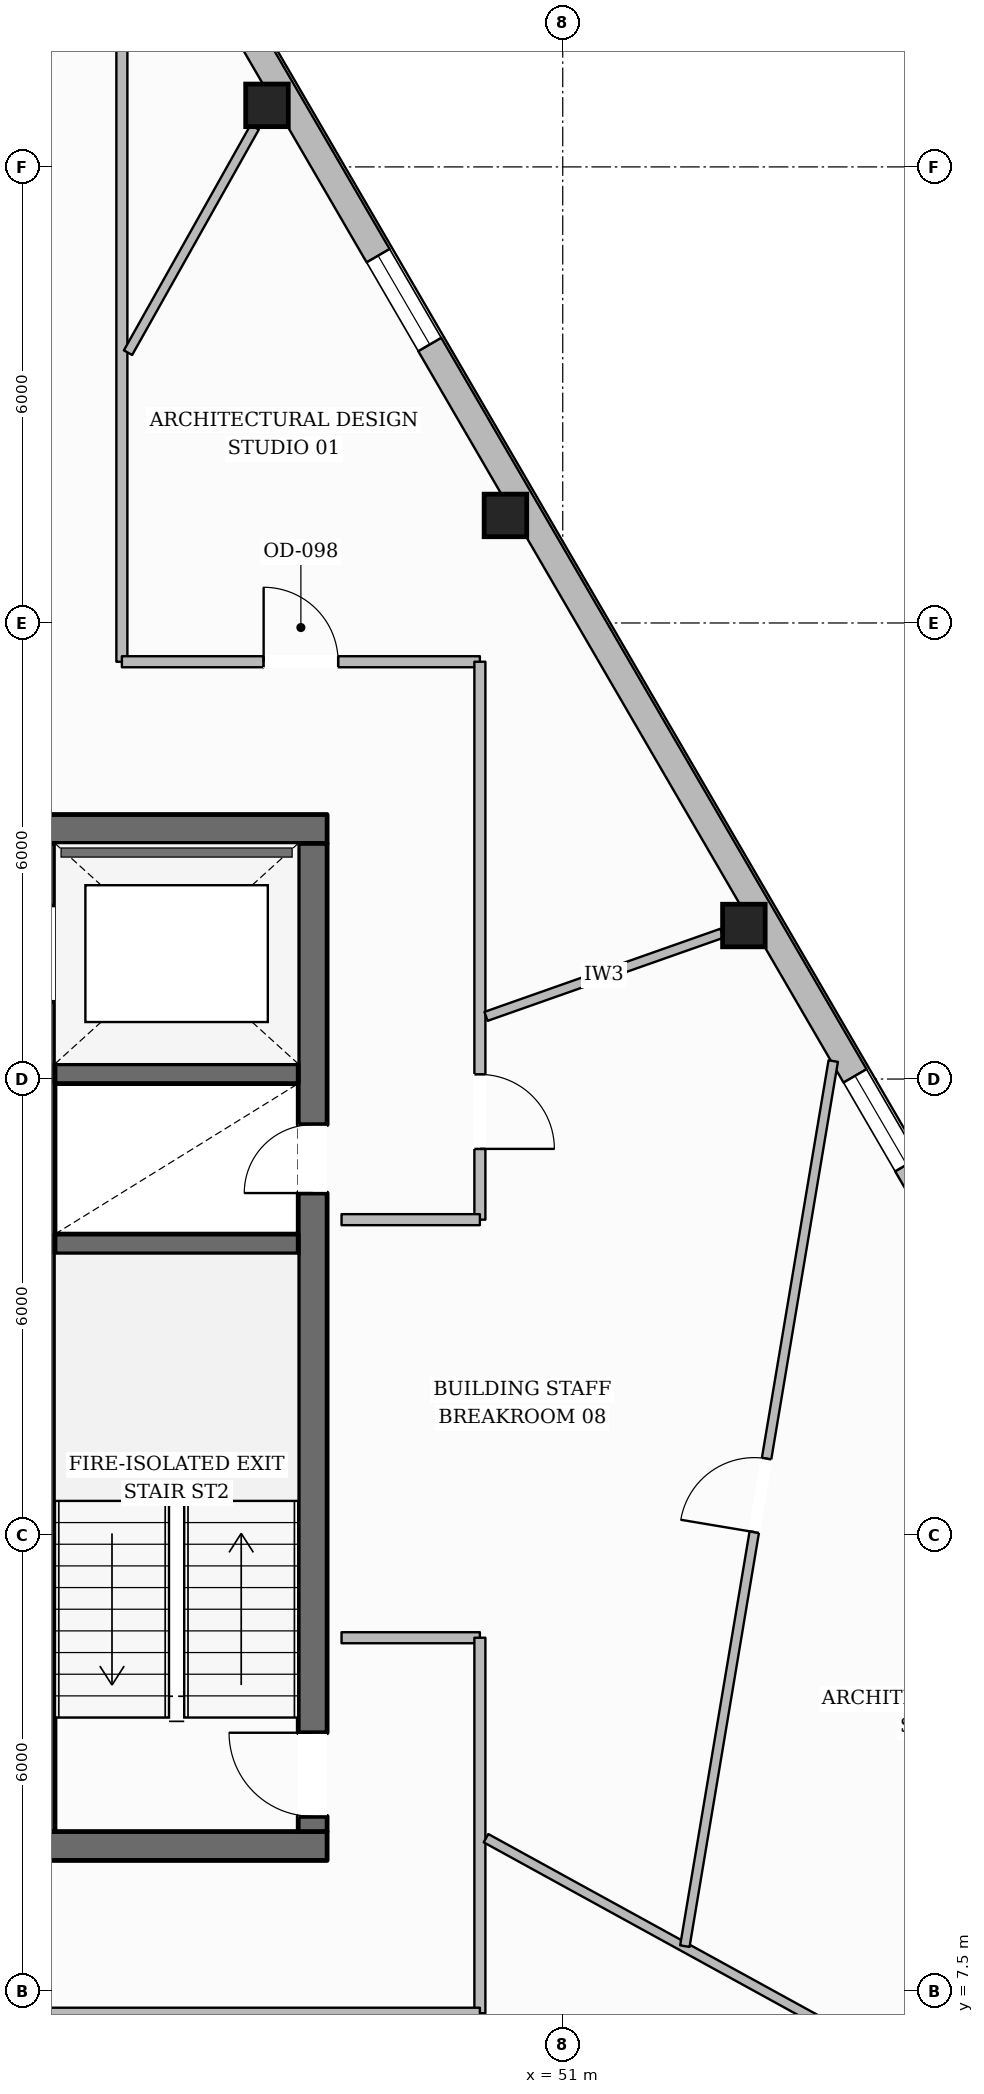
"""IFC4 building model, lengths in metres.
Left out: names, types, materials, properties, quantities, classifications, styles, units other than length and angle.
Written with IfcOpenShell. Run it as: python <this file> out.ifc"""

import sys

from ifc_helpers import new_model, si_unit, direction, frame, frame_2d, origin, origin_2d, place, context, subcontext, project, spatial, rectangle, hollow_rectangle, extrude, element, fill, save


model = new_model("IFC4")
c1 = context("Model", 3, precision=1e-05, world=origin(), true_north=direction((0.0, 1.0)))
c2 = subcontext(c1, "Body", "Model", "MODEL_VIEW")
j1 = project(units=[si_unit("LENGTHUNIT", "METRE"), si_unit("PLANEANGLEUNIT", "RADIAN")], contexts=[c1])
p1 = place(None, origin())
s1 = spatial("IfcSite", under=j1, at=p1, CompositionType="ELEMENT")
p2 = place(p1, origin())
s2 = spatial("IfcBuilding", under=s1, at=p2, CompositionType="ELEMENT")
p3 = place(p2, frame((0.0, 0.0, 281.85)))
s3 = spatial("IfcBuildingStorey", under=s2, at=p3, CompositionType="ELEMENT", Elevation=281.85)
p4 = place(p3, frame((28.1, 9.41, 0.0), z_axis=(0.0, 0.0, 1.0), x_axis=(1.0, 0.0, 0.0)))
e1 = element("IfcWall", 1, at=p4, inside=s3, PredefinedType="SOLIDWALL", context=c2, shape_type="SweptSolid", body=[
    extrude(rectangle(XDim=19.8, YDim=0.38, at=frame_2d((9.9, 0.0))), origin(), (0.0, 0.0, 1.0), 3.61),
])
p5 = place(p4, frame((10.4, 0.0, 0.0)))
e2 = element("IfcOpeningElement", 2, at=p5, cuts=e1, PredefinedType="OPENING", context=c2, shape_type="SweptSolid", body=[
    extrude(rectangle(XDim=1.4, YDim=2.2, at=frame_2d((0.7, 1.1))), frame((0.0, 0.2, 0.0), z_axis=(0.0, -1.0, 0.0), x_axis=(1.0, 0.0, 0.0)), (0.0, 0.0, 1.0), 0.4),
])
p6 = place(p3, frame((28.1, 22.79, 0.0), z_axis=(0.0, 0.0, 1.0), x_axis=(1.0, 0.0, 0.0)))
e3 = element("IfcWall", 3, at=p6, inside=s3, PredefinedType="SOLIDWALL", context=c2, shape_type="SweptSolid", body=[
    extrude(rectangle(XDim=19.8, YDim=0.38, at=frame_2d((9.9, 0.0))), origin(), (0.0, 0.0, 1.0), 3.61),
])
p7 = place(p6, frame((6.175, 0.0, 0.0)))
e4 = element("IfcOpeningElement", 4, at=p7, cuts=e3, PredefinedType="OPENING", context=c2, shape_type="SweptSolid", body=[
    extrude(rectangle(XDim=1.05, YDim=2.15, at=frame_2d((0.525, 1.075))), frame((0.0, 0.2, 0.0), z_axis=(0.0, -1.0, 0.0), x_axis=(1.0, 0.0, 0.0)), (0.0, 0.0, 1.0), 0.4),
])
p8 = place(p6, frame((12.575, 0.0, 0.0)))
e5 = element("IfcOpeningElement", 5, at=p8, cuts=e3, PredefinedType="OPENING", context=c2, shape_type="SweptSolid", body=[
    extrude(rectangle(XDim=1.05, YDim=2.15, at=frame_2d((0.525, 1.075))), frame((0.0, 0.2, 0.0), z_axis=(0.0, -1.0, 0.0), x_axis=(1.0, 0.0, 0.0)), (0.0, 0.0, 1.0), 0.4),
])
p9 = place(p3, frame((47.71, 9.6, 0.0), z_axis=(0.0, 0.0, 1.0), x_axis=(0.0, 1.0, 0.0)))
e6 = element("IfcWall", 6, at=p9, inside=s3, PredefinedType="SOLIDWALL", context=c2, shape_type="SweptSolid", body=[
    extrude(rectangle(XDim=13.0, YDim=0.38, at=frame_2d((6.5, 0.0))), origin(), (0.0, 0.0, 1.0), 3.61),
])
p10 = place(p9, frame((0.2, 0.0, 0.0)))
e7 = element("IfcOpeningElement", 7, at=p10, cuts=e6, PredefinedType="OPENING", context=c2, shape_type="SweptSolid", body=[
    extrude(rectangle(XDim=1.1, YDim=2.15, at=frame_2d((0.55, 1.075))), frame((0.0, 0.2, 0.0), z_axis=(0.0, -1.0, 0.0), x_axis=(1.0, 0.0, 0.0)), (0.0, 0.0, 1.0), 0.4),
])
p11 = place(p9, frame((8.4, 0.0, 0.0)))
e8 = element("IfcOpeningElement", 8, at=p11, cuts=e6, PredefinedType="OPENING", context=c2, shape_type="SweptSolid", body=[
    extrude(rectangle(XDim=0.9, YDim=2.1, at=frame_2d((0.45, 1.05))), frame((0.0, 0.2, 0.0), z_axis=(0.0, -1.0, 0.0), x_axis=(1.0, 0.0, 0.0)), (0.0, 0.0, 1.0), 0.4),
])
p12 = place(p3, frame((44.19, 9.6, 0.0), z_axis=(0.0, 0.0, 1.0), x_axis=(0.0, 1.0, 0.0)))
e9 = element("IfcWall", 9, at=p12, inside=s3, PredefinedType="SHEAR", context=c2, shape_type="SweptSolid", body=[
    extrude(rectangle(XDim=13.0, YDim=0.26, at=frame_2d((6.5, 0.0))), origin(), (0.0, 0.0, 1.0), 3.61),
])
p13 = place(p12, frame((10.925, 0.0, 0.0)))
e10 = element("IfcOpeningElement", 10, at=p13, cuts=e9, PredefinedType="OPENING", context=c2, shape_type="SweptSolid", body=[
    extrude(rectangle(XDim=1.25, YDim=2.25, at=frame_2d((0.625, 1.125))), frame((0.0, 0.14, 0.0), z_axis=(0.0, -1.0, 0.0), x_axis=(1.0, 0.0, 0.0)), (0.0, 0.0, 1.0), 0.28),
])
for number, where, z_axis, x_axis in (
    (11, (44.32, 17.33, 0.0), (0.0, 0.0, 1.0), (1.0, 0.0, 0.0)),
    (12, (44.32, 19.57, 0.0), (0.0, 0.0, 1.0), (1.0, 0.0, 0.0)),
):
    element("IfcWall", number, at=place(p3, frame(where, z_axis=z_axis, x_axis=x_axis)), inside=s3, PredefinedType="SHEAR", context=c2, shape_type="SweptSolid", body=[
        extrude(rectangle(XDim=3.2, YDim=0.26, at=frame_2d((1.6, 0.0))), origin(), (0.0, 0.0, 1.0), 3.61),
    ])
for number, where, z_axis, x_axis in (
    (13, (53.383, 21.52, 0.0), (0.0, 0.0, 1.0), (1.0, 0.0, 0.0)),
    (14, (50.246, 26.915, 0.0), (0.0, 0.0, 1.0), (1.0, 0.0, 0.0)),
    (15, (47.109, 32.31, 0.0), (0.0, 0.0, 1.0), (1.0, 0.0, 0.0)),
):
    element("IfcColumn", number, at=place(p3, frame(where, z_axis=z_axis, x_axis=x_axis)), inside=s3, PredefinedType="COLUMN", context=c2, shape_type="SweptSolid", body=[
        extrude(hollow_rectangle(XDim=0.56, YDim=0.56, WallThickness=0.025, at=origin_2d()), origin(), (0.0, 0.0, 1.0), 3.61),
    ])
p14 = place(p3, frame((40.827, 43.65, 0.0), z_axis=(0.0, 0.0, 1.0), x_axis=(0.502670175865, -0.864478278672, 0.0)))
e16 = element("IfcWall", 16, at=p14, inside=s3, PredefinedType="STANDARD", context=c2, shape_type="SweptSolid", body=[
    extrude(rectangle(XDim=38.406, YDim=0.35, at=frame_2d((19.203, 0.0))), origin(), (0.0, 0.0, 1.0), 3.196),
])
p15 = place(p14, frame((34.128, 0.0, 0.65)))
e17 = element("IfcOpeningElement", 17, at=p15, cuts=e16, PredefinedType="OPENING", context=c2, shape_type="SweptSolid", body=[
    extrude(rectangle(XDim=1.35, YDim=1.75, at=frame_2d((0.675, 0.875))), frame((0.0, 0.185, 0.0), z_axis=(0.0, -1.0, 0.0), x_axis=(1.0, 0.0, 0.0)), (0.0, 0.0, 1.0), 0.37),
])
p16 = place(p14, frame((27.888, 0.0, 0.65)))
e18 = element("IfcOpeningElement", 18, at=p16, cuts=e16, PredefinedType="OPENING", context=c2, shape_type="SweptSolid", body=[
    extrude(rectangle(XDim=1.35, YDim=1.75, at=frame_2d((0.675, 0.875))), frame((0.0, 0.185, 0.0), z_axis=(0.0, -1.0, 0.0), x_axis=(1.0, 0.0, 0.0)), (0.0, 0.0, 1.0), 0.37),
])
p17 = place(p14, frame((15.406, 0.0, 0.65)))
e19 = element("IfcOpeningElement", 19, at=p17, cuts=e16, PredefinedType="OPENING", context=c2, shape_type="SweptSolid", body=[
    extrude(rectangle(XDim=1.35, YDim=1.75, at=frame_2d((0.675, 0.875))), frame((0.0, 0.185, 0.0), z_axis=(0.0, -1.0, 0.0), x_axis=(1.0, 0.0, 0.0)), (0.0, 0.0, 1.0), 0.37),
])
p18 = place(p14, frame((9.165, 0.0, 0.65)))
e20 = element("IfcOpeningElement", 20, at=p18, cuts=e16, PredefinedType="OPENING", context=c2, shape_type="SweptSolid", body=[
    extrude(rectangle(XDim=1.35, YDim=1.75, at=frame_2d((0.675, 0.875))), frame((0.0, 0.185, 0.0), z_axis=(0.0, -1.0, 0.0), x_axis=(1.0, 0.0, 0.0)), (0.0, 0.0, 1.0), 0.37),
])
p19 = place(p14, frame((2.924, 0.0, 0.65)))
e21 = element("IfcOpeningElement", 21, at=p19, cuts=e16, PredefinedType="OPENING", context=c2, shape_type="SweptSolid", body=[
    extrude(rectangle(XDim=1.35, YDim=1.75, at=frame_2d((0.675, 0.875))), frame((0.0, 0.185, 0.0), z_axis=(0.0, -1.0, 0.0), x_axis=(1.0, 0.0, 0.0)), (0.0, 0.0, 1.0), 0.37),
])
p20 = place(p3, frame((45.2, 33.482, 0.0), z_axis=(0.0, 0.0, 1.0), x_axis=(0.0, -1.0, 0.0)))
e22 = element("IfcWall", 22, at=p20, inside=s3, PredefinedType="PARTITIONING", context=c2, shape_type="SweptSolid", body=[
    extrude(rectangle(XDim=8.492, YDim=0.145, at=frame_2d((4.246, 0.0))), origin(), (0.0, 0.0, 1.0), 3.61),
])
p21 = place(p3, frame((45.2, 24.99, 0.0), z_axis=(0.0, 0.0, 1.0), x_axis=(1.0, 0.0, 0.0)))
e23 = element("IfcWall", 23, at=p21, inside=s3, PredefinedType="PARTITIONING", context=c2, shape_type="SweptSolid", body=[
    extrude(rectangle(XDim=4.71, YDim=0.145, at=frame_2d((2.355, 0.0))), origin(), (0.0, 0.0, 1.0), 3.61),
])
p22 = place(p21, frame((1.865, 0.0, 0.0)))
e24 = element("IfcOpeningElement", 24, at=p22, cuts=e23, PredefinedType="OPENING", context=c2, shape_type="SweptSolid", body=[
    extrude(rectangle(XDim=0.98, YDim=2.15, at=frame_2d((0.49, 1.075))), frame((0.0, 0.083, 0.0), z_axis=(0.0, -1.0, 0.0), x_axis=(1.0, 0.0, 0.0)), (0.0, 0.0, 1.0), 0.165),
])
p23 = place(p3, frame((49.91, 24.99, 0.0), z_axis=(0.0, 0.0, 1.0), x_axis=(0.0, -1.0, 0.0)))
e25 = element("IfcWall", 25, at=p23, inside=s3, PredefinedType="PARTITIONING", context=c2, shape_type="SweptSolid", body=[
    extrude(rectangle(XDim=7.34, YDim=0.145, at=frame_2d((3.67, 0.0))), origin(), (0.0, 0.0, 1.0), 3.349),
])
p24 = place(p23, frame((5.429, 0.0, 0.0)))
e26 = element("IfcOpeningElement", 26, at=p24, cuts=e25, PredefinedType="OPENING", context=c2, shape_type="SweptSolid", body=[
    extrude(rectangle(XDim=0.98, YDim=2.15, at=frame_2d((0.49, 1.075))), frame((0.0, 0.083, 0.0), z_axis=(0.0, -1.0, 0.0), x_axis=(1.0, 0.0, 0.0)), (0.0, 0.0, 1.0), 0.165),
])
for number, where, z_axis, x_axis in (
    (27, (49.91, 17.65, 0.0), (0.0, 0.0, 1.0), (-1.0, 0.0, 0.0)),
    (28, (48.09, 12.15, 0.0), (0.0, 0.0, 1.0), (1.0, 0.0, 0.0)),
):
    element("IfcWall", number, at=place(p3, frame(where, z_axis=z_axis, x_axis=x_axis)), inside=s3, PredefinedType="PARTITIONING", context=c2, shape_type="SweptSolid", body=[
        extrude(rectangle(XDim=1.82, YDim=0.145, at=frame_2d((0.91, 0.0))), origin(), (0.0, 0.0, 1.0), 3.61),
    ])
p25 = place(p3, frame((49.91, 12.15, 0.0), z_axis=(0.0, 0.0, 1.0), x_axis=(0.0, -1.0, 0.0)))
e29 = element("IfcWall", 29, at=p25, inside=s3, PredefinedType="PARTITIONING", context=c2, shape_type="SweptSolid", body=[
    extrude(rectangle(XDim=4.94, YDim=0.145, at=frame_2d((2.47, 0.0))), origin(), (0.0, 0.0, 1.0), 3.61),
])
p26 = place(p3, frame((49.91, 7.21, 0.0), z_axis=(0.0, 0.0, 1.0), x_axis=(-1.0, 0.0, 0.0)))
e30 = element("IfcWall", 30, at=p26, inside=s3, PredefinedType="PARTITIONING", context=c2, shape_type="SweptSolid", body=[
    extrude(rectangle(XDim=23.82, YDim=0.145, at=frame_2d((11.91, 0.0))), origin(), (0.0, 0.0, 1.0), 3.61),
])
p27 = place(p26, frame((11.065, 0.0, 0.0)))
e31 = element("IfcOpeningElement", 31, at=p27, cuts=e30, PredefinedType="OPENING", context=c2, shape_type="SweptSolid", body=[
    extrude(rectangle(XDim=0.98, YDim=2.15, at=frame_2d((0.49, 1.075))), frame((0.0, 0.083, 0.0), z_axis=(0.0, -1.0, 0.0), x_axis=(1.0, 0.0, 0.0)), (0.0, 0.0, 1.0), 0.165),
])
p28 = place(p3, frame((49.99, 20.324, 0.0), z_axis=(0.0, 0.0, 1.0), x_axis=(0.943184604902, 0.332269169613, 0.0)))
e32 = element("IfcWall", 32, at=p28, inside=s3, PredefinedType="PARTITIONING", context=c2, shape_type="SweptSolid", body=[
    extrude(rectangle(XDim=3.292, YDim=0.125, at=frame_2d((1.646, 0.0))), origin(), (0.0, 0.0, 1.0), 3.61),
])
p29 = place(p3, frame((45.281, 29.056, 0.0), z_axis=(0.0, 0.0, 1.0), x_axis=(0.489889843692, 0.871784343199, 0.0)))
e33 = element("IfcWall", 33, at=p29, inside=s3, PredefinedType="PARTITIONING", context=c2, shape_type="SweptSolid", body=[
    extrude(rectangle(XDim=3.402, YDim=0.125, at=frame_2d((1.701, 0.0))), origin(), (0.0, 0.0, 1.0), 3.61),
])
p30 = place(p3, frame((49.99, 9.513, 0.0), z_axis=(0.0, 0.0, 1.0), x_axis=(0.876449336432, -0.481494092039, 0.0)))
e34 = element("IfcWall", 34, at=p30, inside=s3, PredefinedType="PARTITIONING", context=c2, shape_type="SweptSolid", body=[
    extrude(rectangle(XDim=7.394, YDim=0.125, at=frame_2d((3.697, 0.0))), origin(), (0.0, 0.0, 1.0), 3.246),
])
p31 = place(p3, frame((52.606, 8.093, 0.0), z_axis=(0.0, 0.0, 1.0), x_axis=(0.165341157719, 0.986236432892, 0.0)))
e35 = element("IfcWall", 35, at=p31, inside=s3, PredefinedType="PARTITIONING", context=c2, shape_type="SweptSolid", body=[
    extrude(rectangle(XDim=11.807, YDim=0.125, at=frame_2d((5.903, 0.0))), origin(), (0.0, 0.0, 1.0), 3.349),
])
p32 = place(p31, frame((5.523, 0.0, 0.0)))
e36 = element("IfcOpeningElement", 36, at=p32, cuts=e35, PredefinedType="OPENING", context=c2, shape_type="SweptSolid", body=[
    extrude(rectangle(XDim=0.98, YDim=2.15, at=frame_2d((0.49, 1.075))), frame((0.0, 0.073, 0.0), z_axis=(0.0, -1.0, 0.0), x_axis=(1.0, 0.0, 0.0)), (0.0, 0.0, 1.0), 0.145),
])
p33 = place(p16, origin())
e37 = element("IfcWindow", 37, at=p33, inside=s3, PartitioningType="SINGLE_PANEL", PredefinedType="WINDOW", context=c2, shape_type="SweptSolid", body=[
    extrude(rectangle(XDim=1.35, YDim=1.75, at=frame_2d((0.675, 0.875))), frame((0.0, 0.03, 0.0), z_axis=(0.0, -1.0, 0.0), x_axis=(1.0, 0.0, 0.0)), (0.0, 0.0, 1.0), 0.06),
])
fill(e18, e37)
p34 = place(p17, origin())
e38 = element("IfcWindow", 38, at=p34, inside=s3, PartitioningType="SINGLE_PANEL", PredefinedType="WINDOW", context=c2, shape_type="SweptSolid", body=[
    extrude(rectangle(XDim=1.35, YDim=1.75, at=frame_2d((0.675, 0.875))), frame((0.0, 0.03, 0.0), z_axis=(0.0, -1.0, 0.0), x_axis=(1.0, 0.0, 0.0)), (0.0, 0.0, 1.0), 0.06),
])
fill(e19, e38)
p35 = place(p10, origin())
e39 = element("IfcDoor", 39, at=p35, inside=s3, OperationType="SINGLE_SWING_RIGHT", PredefinedType="DOOR", context=c2, shape_type="SweptSolid", body=[
    extrude(rectangle(XDim=1.1, YDim=2.15, at=frame_2d((0.55, 1.075))), frame((0.0, 0.025, 0.0), z_axis=(0.0, -1.0, 0.0), x_axis=(1.0, 0.0, 0.0)), (0.0, 0.0, 1.0), 0.05),
])
fill(e7, e39)
p36 = place(p11, origin())
e40 = element("IfcDoor", 40, at=p36, inside=s3, OperationType="SINGLE_SWING_LEFT", PredefinedType="DOOR", context=c2, shape_type="SweptSolid", body=[
    extrude(rectangle(XDim=0.9, YDim=2.1, at=frame_2d((0.45, 1.05))), frame((0.0, 0.025, 0.0), z_axis=(0.0, -1.0, 0.0), x_axis=(1.0, 0.0, 0.0)), (0.0, 0.0, 1.0), 0.05),
])
fill(e8, e40)
p37 = place(p22, origin())
e41 = element("IfcDoor", 41, at=p37, inside=s3, OperationType="SINGLE_SWING_LEFT", PredefinedType="DOOR", context=c2, shape_type="SweptSolid", body=[
    extrude(rectangle(XDim=0.98, YDim=2.15, at=frame_2d((0.49, 1.075))), frame((0.0, 0.025, 0.0), z_axis=(0.0, -1.0, 0.0), x_axis=(1.0, 0.0, 0.0)), (0.0, 0.0, 1.0), 0.05),
])
fill(e24, e41)
p38 = place(p24, origin())
e42 = element("IfcDoor", 42, at=p38, inside=s3, OperationType="SINGLE_SWING_RIGHT", PredefinedType="DOOR", context=c2, shape_type="SweptSolid", body=[
    extrude(rectangle(XDim=0.98, YDim=2.15, at=frame_2d((0.49, 1.075))), frame((0.0, 0.025, 0.0), z_axis=(0.0, -1.0, 0.0), x_axis=(1.0, 0.0, 0.0)), (0.0, 0.0, 1.0), 0.05),
])
fill(e26, e42)
p39 = place(p32, origin())
e43 = element("IfcDoor", 43, at=p39, inside=s3, OperationType="SINGLE_SWING_LEFT", PredefinedType="DOOR", context=c2, shape_type="SweptSolid", body=[
    extrude(rectangle(XDim=0.98, YDim=2.15, at=frame_2d((0.49, 1.075))), frame((0.0, 0.025, 0.0), z_axis=(0.0, -1.0, 0.0), x_axis=(1.0, 0.0, 0.0)), (0.0, 0.0, 1.0), 0.05),
])
fill(e36, e43)
save(model, sys.argv[1])
